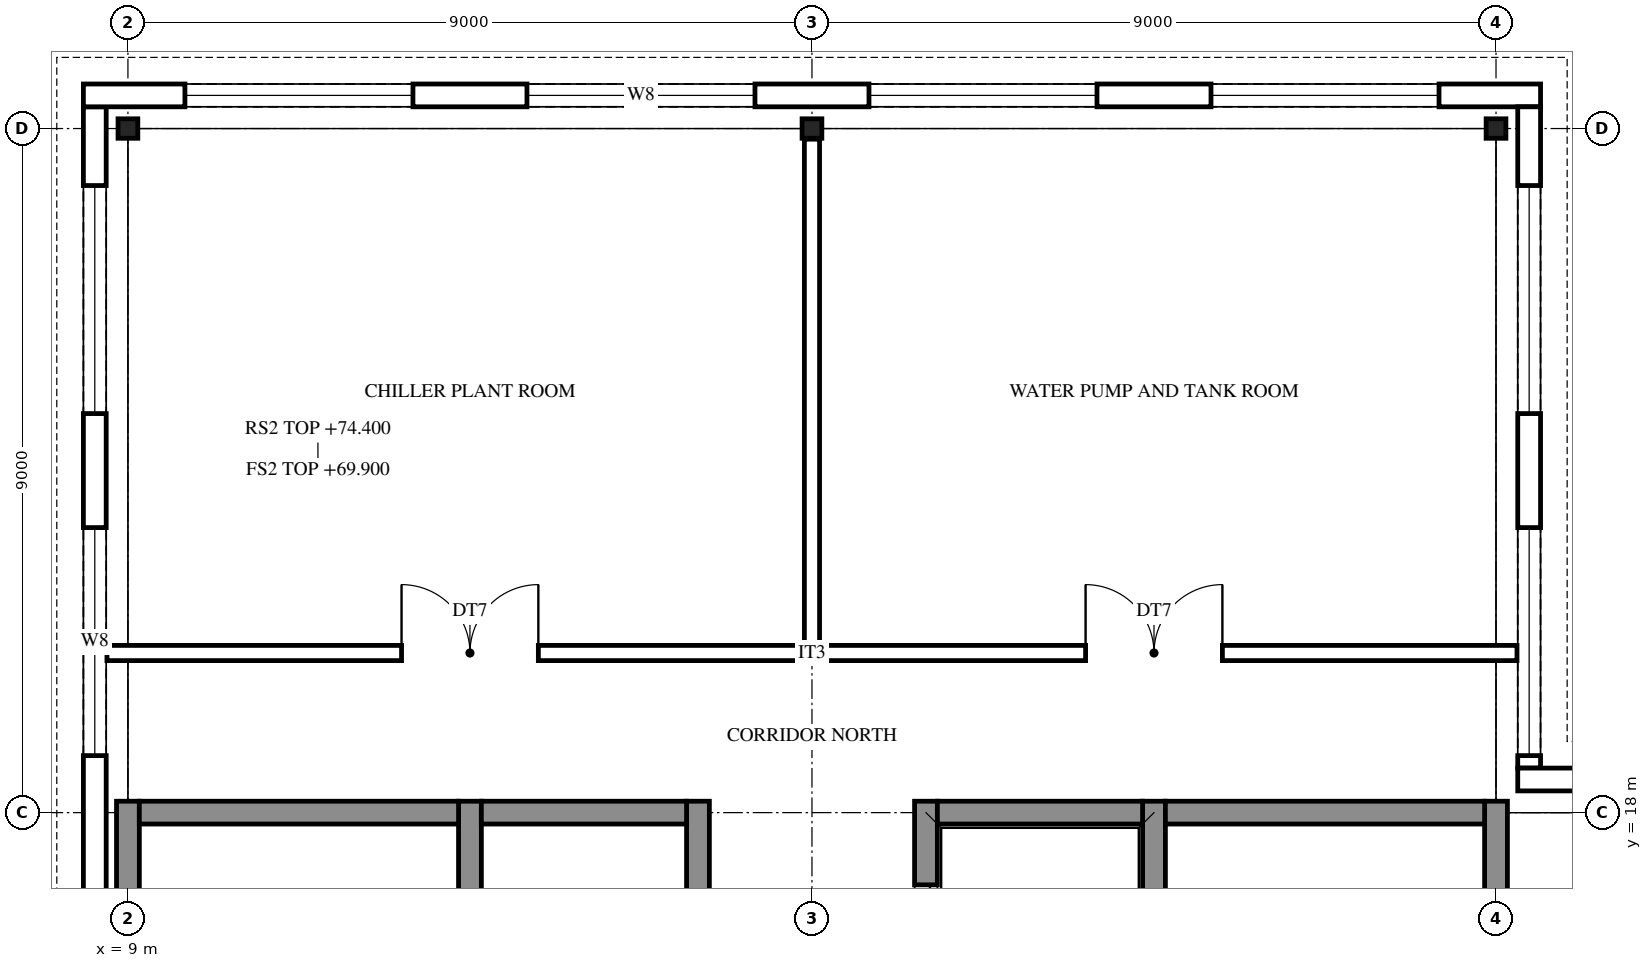
"""IFC4 building model, lengths in metres.
Left out: names, types, materials, properties, quantities, classifications, styles, units other than length and angle.
Written with IfcOpenShell. Run it as: python <this file> out.ifc"""

import sys

from ifc_helpers import new_model, si_unit, direction, frame, frame_2d, origin, origin_2d, place, context, subcontext, project, spatial, rectangle, i_section, extrude, element, fill, save


model = new_model("IFC4")
c1 = context("Model", 3, precision=1e-05, world=origin(), true_north=direction((0.0, 1.0)))
c2 = subcontext(c1, "Body", "Model", "MODEL_VIEW")
j1 = project(units=[si_unit("LENGTHUNIT", "METRE"), si_unit("PLANEANGLEUNIT", "RADIAN")], contexts=[c1])
p1 = place(None, origin())
s1 = spatial("IfcSite", under=j1, at=p1, CompositionType="ELEMENT")
p2 = place(p1, origin())
s2 = spatial("IfcBuilding", under=s1, at=p2, CompositionType="ELEMENT")
p3 = place(p2, frame((0.0, 0.0, 69.9)))
s3 = spatial("IfcBuildingStorey", under=s2, at=p3, CompositionType="ELEMENT", Elevation=69.9)
for number, where, z_axis, x_axis in (
    (1, (9.0, 27.0, 0.0), (0.0, 0.0, 1.0), (0.0, 1.0, 0.0)),
    (2, (18.0, 27.0, 0.0), (0.0, 0.0, 1.0), (0.0, 1.0, 0.0)),
    (3, (27.0, 27.0, 0.0), (0.0, 0.0, 1.0), (0.0, 1.0, 0.0)),
):
    element("IfcColumn", number, at=place(p3, frame(where, z_axis=z_axis, x_axis=x_axis)), inside=s3, PredefinedType="COLUMN", context=c2, shape_type="SweptSolid", body=[
        extrude(i_section(OverallWidth=0.256, OverallDepth=0.26, WebThickness=0.01, FlangeThickness=0.017, FilletRadius=0.014, at=origin_2d()), origin(), (0.0, 0.0, 1.0), 4.5),
    ])
for number, where, z_axis, x_axis in (
    (4, (9.0, 8.85, 0.0), (0.0, 0.0, 1.0), (0.0, 1.0, 0.0)),
    (5, (13.5, 8.85, 0.0), (0.0, 0.0, 1.0), (0.0, 1.0, 0.0)),
):
    element("IfcWall", number, at=place(p3, frame(where, z_axis=z_axis, x_axis=x_axis)), inside=s3, PredefinedType="SHEAR", context=c2, shape_type="SweptSolid", body=[
        extrude(rectangle(XDim=9.3, YDim=0.3, at=frame_2d((4.65, 0.0))), origin(), (0.0, 0.0, 1.0), 4.5),
    ])
p4 = place(p3, frame((16.5, 8.85, 0.0), z_axis=(0.0, 0.0, 1.0), x_axis=(0.0, 1.0, 0.0)))
e6 = element("IfcWall", 6, at=p4, inside=s3, PredefinedType="SHEAR", context=c2, shape_type="SweptSolid", body=[
    extrude(rectangle(XDim=9.3, YDim=0.3, at=frame_2d((4.65, 0.0))), origin(), (0.0, 0.0, 1.0), 4.5),
])
p5 = place(p4, frame((1.1, 0.0, 0.0)))
e7 = element("IfcOpeningElement", 7, at=p5, cuts=e6, PredefinedType="OPENING", context=c2, shape_type="SweptSolid", body=[
    extrude(rectangle(XDim=1.1, YDim=2.1, at=frame_2d((0.55, 1.05))), frame((0.0, 0.16, 0.0), z_axis=(0.0, -1.0, 0.0), x_axis=(1.0, 0.0, 0.0)), (0.0, 0.0, 1.0), 0.32),
])
p6 = place(p4, frame((4.1, 0.0, 0.0)))
e8 = element("IfcOpeningElement", 8, at=p6, cuts=e6, PredefinedType="OPENING", context=c2, shape_type="SweptSolid", body=[
    extrude(rectangle(XDim=1.1, YDim=2.1, at=frame_2d((0.55, 1.05))), frame((0.0, 0.16, 0.0), z_axis=(0.0, -1.0, 0.0), x_axis=(1.0, 0.0, 0.0)), (0.0, 0.0, 1.0), 0.32),
])
p7 = place(p3, frame((19.5, 8.85, 0.0), z_axis=(0.0, 0.0, 1.0), x_axis=(0.0, 1.0, 0.0)))
e9 = element("IfcWall", 9, at=p7, inside=s3, PredefinedType="SHEAR", context=c2, shape_type="SweptSolid", body=[
    extrude(rectangle(XDim=9.3, YDim=0.3, at=frame_2d((4.65, 0.0))), origin(), (0.0, 0.0, 1.0), 4.5),
])
p8 = place(p7, frame((3.95, 0.0, 0.0)))
e10 = element("IfcOpeningElement", 10, at=p8, cuts=e9, PredefinedType="OPENING", context=c2, shape_type="SweptSolid", body=[
    extrude(rectangle(XDim=1.4, YDim=2.1, at=frame_2d((0.7, 1.05))), frame((0.0, 0.16, 0.0), z_axis=(0.0, -1.0, 0.0), x_axis=(1.0, 0.0, 0.0)), (0.0, 0.0, 1.0), 0.32),
])
p9 = place(p7, frame((7.1, 0.0, 0.0)))
e11 = element("IfcOpeningElement", 11, at=p9, cuts=e9, PredefinedType="OPENING", context=c2, shape_type="SweptSolid", body=[
    extrude(rectangle(XDim=1.1, YDim=2.1, at=frame_2d((0.55, 1.05))), frame((0.0, 0.16, 0.0), z_axis=(0.0, -1.0, 0.0), x_axis=(1.0, 0.0, 0.0)), (0.0, 0.0, 1.0), 0.32),
])
for number, where, z_axis, x_axis in (
    (12, (22.5, 8.85, 0.0), (0.0, 0.0, 1.0), (0.0, 1.0, 0.0)),
    (13, (27.0, 8.85, 0.0), (0.0, 0.0, 1.0), (0.0, 1.0, 0.0)),
):
    element("IfcWall", number, at=place(p3, frame(where, z_axis=z_axis, x_axis=x_axis)), inside=s3, PredefinedType="SHEAR", context=c2, shape_type="SweptSolid", body=[
        extrude(rectangle(XDim=9.3, YDim=0.3, at=frame_2d((4.65, 0.0))), origin(), (0.0, 0.0, 1.0), 4.5),
    ])
p10 = place(p3, frame((9.15, 18.0, 0.0), z_axis=(0.0, 0.0, 1.0), x_axis=(1.0, 0.0, 0.0)))
e14 = element("IfcWall", 14, at=p10, inside=s3, PredefinedType="SHEAR", context=c2, shape_type="SweptSolid", body=[
    extrude(rectangle(XDim=4.2, YDim=0.3, at=frame_2d((2.1, 0.0))), origin(), (0.0, 0.0, 1.0), 4.5),
])
for number, where, z_axis, x_axis in (
    (15, (13.65, 18.0, 0.0), (0.0, 0.0, 1.0), (1.0, 0.0, 0.0)),
    (16, (19.65, 18.0, 0.0), (0.0, 0.0, 1.0), (1.0, 0.0, 0.0)),
):
    element("IfcWall", number, at=place(p3, frame(where, z_axis=z_axis, x_axis=x_axis)), inside=s3, PredefinedType="SHEAR", context=c2, shape_type="SweptSolid", body=[
        extrude(rectangle(XDim=2.7, YDim=0.3, at=frame_2d((1.35, 0.0))), origin(), (0.0, 0.0, 1.0), 4.5),
    ])
p11 = place(p3, frame((22.65, 18.0, 0.0), z_axis=(0.0, 0.0, 1.0), x_axis=(1.0, 0.0, 0.0)))
e17 = element("IfcWall", 17, at=p11, inside=s3, PredefinedType="SHEAR", context=c2, shape_type="SweptSolid", body=[
    extrude(rectangle(XDim=4.2, YDim=0.3, at=frame_2d((2.1, 0.0))), origin(), (0.0, 0.0, 1.0), 4.5),
])
p12 = place(p3, frame((8.564, -0.286, 0.0), z_axis=(0.0, 0.0, 1.0), x_axis=(0.0, 1.0, 0.0)))
e18 = element("IfcWall", 18, at=p12, inside=s3, PredefinedType="STANDARD", context=c2, shape_type="SweptSolid", body=[
    extrude(rectangle(XDim=27.572, YDim=0.3, at=frame_2d((13.786, 0.0))), origin(), (0.0, 0.0, 1.0), 4.5),
])
p13 = place(p12, frame((1.036, 0.0, 0.6)))
e19 = element("IfcOpeningElement", 19, at=p13, cuts=e18, PredefinedType="OPENING", context=c2, shape_type="SweptSolid", body=[
    extrude(rectangle(XDim=3.0, YDim=3.1, at=frame_2d((1.5, 1.55))), frame((0.0, 0.16, 0.0), z_axis=(0.0, -1.0, 0.0), x_axis=(1.0, 0.0, 0.0)), (0.0, 0.0, 1.0), 0.32),
])
p14 = place(p12, frame((5.536, 0.0, 0.6)))
e20 = element("IfcOpeningElement", 20, at=p14, cuts=e18, PredefinedType="OPENING", context=c2, shape_type="SweptSolid", body=[
    extrude(rectangle(XDim=3.0, YDim=3.1, at=frame_2d((1.5, 1.55))), frame((0.0, 0.16, 0.0), z_axis=(0.0, -1.0, 0.0), x_axis=(1.0, 0.0, 0.0)), (0.0, 0.0, 1.0), 0.32),
])
p15 = place(p12, frame((19.036, 0.0, 0.6)))
e21 = element("IfcOpeningElement", 21, at=p15, cuts=e18, PredefinedType="OPENING", context=c2, shape_type="SweptSolid", body=[
    extrude(rectangle(XDim=3.0, YDim=3.1, at=frame_2d((1.5, 1.55))), frame((0.0, 0.16, 0.0), z_axis=(0.0, -1.0, 0.0), x_axis=(1.0, 0.0, 0.0)), (0.0, 0.0, 1.0), 0.32),
])
p16 = place(p12, frame((23.536, 0.0, 0.6)))
e22 = element("IfcOpeningElement", 22, at=p16, cuts=e18, PredefinedType="OPENING", context=c2, shape_type="SweptSolid", body=[
    extrude(rectangle(XDim=3.0, YDim=3.1, at=frame_2d((1.5, 1.55))), frame((0.0, 0.16, 0.0), z_axis=(0.0, -1.0, 0.0), x_axis=(1.0, 0.0, 0.0)), (0.0, 0.0, 1.0), 0.32),
])
p17 = place(p3, frame((8.414, 27.436, 0.0), z_axis=(0.0, 0.0, 1.0), x_axis=(1.0, 0.0, 0.0)))
e23 = element("IfcWall", 23, at=p17, inside=s3, PredefinedType="STANDARD", context=c2, shape_type="SweptSolid", body=[
    extrude(rectangle(XDim=19.172, YDim=0.3, at=frame_2d((9.586, 0.0))), origin(), (0.0, 0.0, 1.0), 4.5),
])
p18 = place(p17, frame((1.336, 0.0, 0.6)))
e24 = element("IfcOpeningElement", 24, at=p18, cuts=e23, PredefinedType="OPENING", context=c2, shape_type="SweptSolid", body=[
    extrude(rectangle(XDim=3.0, YDim=3.1, at=frame_2d((1.5, 1.55))), frame((0.0, 0.16, 0.0), z_axis=(0.0, -1.0, 0.0), x_axis=(1.0, 0.0, 0.0)), (0.0, 0.0, 1.0), 0.32),
])
p19 = place(p17, frame((5.836, 0.0, 0.6)))
e25 = element("IfcOpeningElement", 25, at=p19, cuts=e23, PredefinedType="OPENING", context=c2, shape_type="SweptSolid", body=[
    extrude(rectangle(XDim=3.0, YDim=3.1, at=frame_2d((1.5, 1.55))), frame((0.0, 0.16, 0.0), z_axis=(0.0, -1.0, 0.0), x_axis=(1.0, 0.0, 0.0)), (0.0, 0.0, 1.0), 0.32),
])
p20 = place(p17, frame((10.336, 0.0, 0.6)))
e26 = element("IfcOpeningElement", 26, at=p20, cuts=e23, PredefinedType="OPENING", context=c2, shape_type="SweptSolid", body=[
    extrude(rectangle(XDim=3.0, YDim=3.1, at=frame_2d((1.5, 1.55))), frame((0.0, 0.16, 0.0), z_axis=(0.0, -1.0, 0.0), x_axis=(1.0, 0.0, 0.0)), (0.0, 0.0, 1.0), 0.32),
])
p21 = place(p17, frame((14.836, 0.0, 0.6)))
e27 = element("IfcOpeningElement", 27, at=p21, cuts=e23, PredefinedType="OPENING", context=c2, shape_type="SweptSolid", body=[
    extrude(rectangle(XDim=3.0, YDim=3.1, at=frame_2d((1.5, 1.55))), frame((0.0, 0.16, 0.0), z_axis=(0.0, -1.0, 0.0), x_axis=(1.0, 0.0, 0.0)), (0.0, 0.0, 1.0), 0.32),
])
p22 = place(p3, frame((27.436, 27.286, 0.0), z_axis=(0.0, 0.0, 1.0), x_axis=(0.0, -1.0, 0.0)))
e28 = element("IfcWall", 28, at=p22, inside=s3, PredefinedType="STANDARD", context=c2, shape_type="SweptSolid", body=[
    extrude(rectangle(XDim=8.7, YDim=0.3, at=frame_2d((4.35, 0.0))), origin(), (0.0, 0.0, 1.0), 4.5),
])
p23 = place(p22, frame((5.536, 0.0, 0.6)))
e29 = element("IfcOpeningElement", 29, at=p23, cuts=e28, PredefinedType="OPENING", context=c2, shape_type="SweptSolid", body=[
    extrude(rectangle(XDim=3.0, YDim=3.1, at=frame_2d((1.5, 1.55))), frame((0.0, 0.16, 0.0), z_axis=(0.0, -1.0, 0.0), x_axis=(1.0, 0.0, 0.0)), (0.0, 0.0, 1.0), 0.32),
])
p24 = place(p22, frame((1.036, 0.0, 0.6)))
e30 = element("IfcOpeningElement", 30, at=p24, cuts=e28, PredefinedType="OPENING", context=c2, shape_type="SweptSolid", body=[
    extrude(rectangle(XDim=3.0, YDim=3.1, at=frame_2d((1.5, 1.55))), frame((0.0, 0.16, 0.0), z_axis=(0.0, -1.0, 0.0), x_axis=(1.0, 0.0, 0.0)), (0.0, 0.0, 1.0), 0.32),
])
p25 = place(p3, frame((27.286, 18.436, 0.0), z_axis=(0.0, 0.0, 1.0), x_axis=(1.0, 0.0, 0.0)))
e31 = element("IfcWall", 31, at=p25, inside=s3, PredefinedType="STANDARD", context=c2, shape_type="SweptSolid", body=[
    extrude(rectangle(XDim=4.789, YDim=0.3, at=frame_2d((2.395, 0.0))), origin(), (0.0, 0.0, 1.0), 4.5),
])
p26 = place(p3, frame((8.564, -0.286, 4.5), z_axis=(0.0, 0.0, 1.0), x_axis=(0.0, 1.0, 0.0)))
e32 = element("IfcWall", 32, at=p26, inside=s3, PredefinedType="PARAPET", context=c2, shape_type="SweptSolid", body=[
    extrude(rectangle(XDim=27.572, YDim=0.3, at=frame_2d((13.786, 0.0))), origin(), (0.0, 0.0, 1.0), 1.25),
])
p27 = place(p3, frame((8.414, 27.436, 4.5), z_axis=(0.0, 0.0, 1.0), x_axis=(1.0, 0.0, 0.0)))
e33 = element("IfcWall", 33, at=p27, inside=s3, PredefinedType="PARAPET", context=c2, shape_type="SweptSolid", body=[
    extrude(rectangle(XDim=19.172, YDim=0.3, at=frame_2d((9.586, 0.0))), origin(), (0.0, 0.0, 1.0), 1.25),
])
p28 = place(p3, frame((27.436, 27.286, 4.5), z_axis=(0.0, 0.0, 1.0), x_axis=(0.0, -1.0, 0.0)))
e34 = element("IfcWall", 34, at=p28, inside=s3, PredefinedType="PARAPET", context=c2, shape_type="SweptSolid", body=[
    extrude(rectangle(XDim=8.7, YDim=0.3, at=frame_2d((4.35, 0.0))), origin(), (0.0, 0.0, 1.0), 1.25),
])
p29 = place(p3, frame((27.286, 18.436, 4.5), z_axis=(0.0, 0.0, 1.0), x_axis=(1.0, 0.0, 0.0)))
e35 = element("IfcWall", 35, at=p29, inside=s3, PredefinedType="PARAPET", context=c2, shape_type="SweptSolid", body=[
    extrude(rectangle(XDim=4.789, YDim=0.3, at=frame_2d((2.395, 0.0))), origin(), (0.0, 0.0, 1.0), 1.25),
])
p30 = place(p3, frame((18.0, 20.21, 0.0), z_axis=(0.0, 0.0, 1.0), x_axis=(0.0, 1.0, 0.0)))
e36 = element("IfcWall", 36, at=p30, inside=s3, PredefinedType="PARTITIONING", context=c2, shape_type="SweptSolid", body=[
    extrude(rectangle(XDim=6.65, YDim=0.2, at=frame_2d((3.325, 0.0))), origin(), (0.0, 0.0, 1.0), 3.822),
])
p31 = place(p3, frame((8.724, 20.1, 0.0), z_axis=(0.0, 0.0, 1.0), x_axis=(1.0, 0.0, 0.0)))
e37 = element("IfcWall", 37, at=p31, inside=s3, PredefinedType="PARTITIONING", context=c2, shape_type="SweptSolid", body=[
    extrude(rectangle(XDim=18.552, YDim=0.2, at=frame_2d((9.276, 0.0))), origin(), (0.0, 0.0, 1.0), 3.822),
])
p32 = place(p31, frame((3.876, 0.0, 0.0)))
e38 = element("IfcOpeningElement", 38, at=p32, cuts=e37, PredefinedType="OPENING", context=c2, shape_type="SweptSolid", body=[
    extrude(rectangle(XDim=1.8, YDim=2.1, at=frame_2d((0.9, 1.05))), frame((0.0, 0.11, 0.0), z_axis=(0.0, -1.0, 0.0), x_axis=(1.0, 0.0, 0.0)), (0.0, 0.0, 1.0), 0.22),
])
p33 = place(p31, frame((12.876, 0.0, 0.0)))
e39 = element("IfcOpeningElement", 39, at=p33, cuts=e37, PredefinedType="OPENING", context=c2, shape_type="SweptSolid", body=[
    extrude(rectangle(XDim=1.8, YDim=2.1, at=frame_2d((0.9, 1.05))), frame((0.0, 0.11, 0.0), z_axis=(0.0, -1.0, 0.0), x_axis=(1.0, 0.0, 0.0)), (0.0, 0.0, 1.0), 0.22),
])
for number, where, z_axis, x_axis in (
    (40, (13.5, 8.85, 4.5), (0.0, 0.0, 1.0), (0.0, 1.0, 0.0)),
    (41, (16.5, 8.85, 4.5), (0.0, 0.0, 1.0), (0.0, 1.0, 0.0)),
):
    element("IfcWall", number, at=place(p3, frame(where, z_axis=z_axis, x_axis=x_axis)), inside=s3, PredefinedType="SOLIDWALL", context=c2, shape_type="SweptSolid", body=[
        extrude(rectangle(XDim=9.3, YDim=0.3, at=frame_2d((4.65, 0.0))), origin(), (0.0, 0.0, 1.0), 4.5),
    ])
p34 = place(p3, frame((13.65, 18.0, 4.5), z_axis=(0.0, 0.0, 1.0), x_axis=(1.0, 0.0, 0.0)))
e42 = element("IfcWall", 42, at=p34, inside=s3, PredefinedType="SOLIDWALL", context=c2, shape_type="SweptSolid", body=[
    extrude(rectangle(XDim=2.7, YDim=0.3, at=frame_2d((1.35, 0.0))), origin(), (0.0, 0.0, 1.0), 4.5),
])
for number, where, z_axis, x_axis in (
    (43, (19.5, 8.85, 4.5), (0.0, 0.0, 1.0), (0.0, 1.0, 0.0)),
    (44, (22.5, 8.85, 4.5), (0.0, 0.0, 1.0), (0.0, 1.0, 0.0)),
):
    element("IfcWall", number, at=place(p3, frame(where, z_axis=z_axis, x_axis=x_axis)), inside=s3, PredefinedType="SOLIDWALL", context=c2, shape_type="SweptSolid", body=[
        extrude(rectangle(XDim=9.3, YDim=0.3, at=frame_2d((4.65, 0.0))), origin(), (0.0, 0.0, 1.0), 4.5),
    ])
p35 = place(p3, frame((19.65, 18.0, 4.5), z_axis=(0.0, 0.0, 1.0), x_axis=(1.0, 0.0, 0.0)))
e45 = element("IfcWall", 45, at=p35, inside=s3, PredefinedType="SOLIDWALL", context=c2, shape_type="SweptSolid", body=[
    extrude(rectangle(XDim=2.7, YDim=0.3, at=frame_2d((1.35, 0.0))), origin(), (0.0, 0.0, 1.0), 4.5),
])
p36 = place(p15, origin())
e46 = element("IfcWindow", 46, at=p36, inside=s3, PartitioningType="SINGLE_PANEL", PredefinedType="WINDOW", context=c2, shape_type="SweptSolid", body=[
    extrude(rectangle(XDim=3.0, YDim=3.1, at=frame_2d((1.5, 1.55))), frame((0.0, 0.03, 0.0), z_axis=(0.0, -1.0, 0.0), x_axis=(1.0, 0.0, 0.0)), (0.0, 0.0, 1.0), 0.06),
])
fill(e21, e46)
p37 = place(p16, origin())
e47 = element("IfcWindow", 47, at=p37, inside=s3, PartitioningType="SINGLE_PANEL", PredefinedType="WINDOW", context=c2, shape_type="SweptSolid", body=[
    extrude(rectangle(XDim=3.0, YDim=3.1, at=frame_2d((1.5, 1.55))), frame((0.0, 0.03, 0.0), z_axis=(0.0, -1.0, 0.0), x_axis=(1.0, 0.0, 0.0)), (0.0, 0.0, 1.0), 0.06),
])
fill(e22, e47)
p38 = place(p18, origin())
e48 = element("IfcWindow", 48, at=p38, inside=s3, PartitioningType="SINGLE_PANEL", PredefinedType="WINDOW", context=c2, shape_type="SweptSolid", body=[
    extrude(rectangle(XDim=3.0, YDim=3.1, at=frame_2d((1.5, 1.55))), frame((0.0, 0.03, 0.0), z_axis=(0.0, -1.0, 0.0), x_axis=(1.0, 0.0, 0.0)), (0.0, 0.0, 1.0), 0.06),
])
fill(e24, e48)
p39 = place(p19, origin())
e49 = element("IfcWindow", 49, at=p39, inside=s3, PartitioningType="SINGLE_PANEL", PredefinedType="WINDOW", context=c2, shape_type="SweptSolid", body=[
    extrude(rectangle(XDim=3.0, YDim=3.1, at=frame_2d((1.5, 1.55))), frame((0.0, 0.03, 0.0), z_axis=(0.0, -1.0, 0.0), x_axis=(1.0, 0.0, 0.0)), (0.0, 0.0, 1.0), 0.06),
])
fill(e25, e49)
p40 = place(p20, origin())
e50 = element("IfcWindow", 50, at=p40, inside=s3, PartitioningType="SINGLE_PANEL", PredefinedType="WINDOW", context=c2, shape_type="SweptSolid", body=[
    extrude(rectangle(XDim=3.0, YDim=3.1, at=frame_2d((1.5, 1.55))), frame((0.0, 0.03, 0.0), z_axis=(0.0, -1.0, 0.0), x_axis=(1.0, 0.0, 0.0)), (0.0, 0.0, 1.0), 0.06),
])
fill(e26, e50)
p41 = place(p21, origin())
e51 = element("IfcWindow", 51, at=p41, inside=s3, PartitioningType="SINGLE_PANEL", PredefinedType="WINDOW", context=c2, shape_type="SweptSolid", body=[
    extrude(rectangle(XDim=3.0, YDim=3.1, at=frame_2d((1.5, 1.55))), frame((0.0, 0.03, 0.0), z_axis=(0.0, -1.0, 0.0), x_axis=(1.0, 0.0, 0.0)), (0.0, 0.0, 1.0), 0.06),
])
fill(e27, e51)
p42 = place(p23, origin())
e52 = element("IfcWindow", 52, at=p42, inside=s3, PartitioningType="SINGLE_PANEL", PredefinedType="WINDOW", context=c2, shape_type="SweptSolid", body=[
    extrude(rectangle(XDim=3.0, YDim=3.1, at=frame_2d((1.5, 1.55))), frame((0.0, 0.03, 0.0), z_axis=(0.0, -1.0, 0.0), x_axis=(1.0, 0.0, 0.0)), (0.0, 0.0, 1.0), 0.06),
])
fill(e29, e52)
p43 = place(p24, origin())
e53 = element("IfcWindow", 53, at=p43, inside=s3, PartitioningType="SINGLE_PANEL", PredefinedType="WINDOW", context=c2, shape_type="SweptSolid", body=[
    extrude(rectangle(XDim=3.0, YDim=3.1, at=frame_2d((1.5, 1.55))), frame((0.0, 0.03, 0.0), z_axis=(0.0, -1.0, 0.0), x_axis=(1.0, 0.0, 0.0)), (0.0, 0.0, 1.0), 0.06),
])
fill(e30, e53)
p44 = place(p32, origin())
e54 = element("IfcDoor", 54, at=p44, inside=s3, OperationType="DOUBLE_DOOR_SINGLE_SWING", PredefinedType="DOOR", context=c2, shape_type="SweptSolid", body=[
    extrude(rectangle(XDim=1.8, YDim=2.1, at=frame_2d((0.9, 1.05))), frame((0.0, 0.025, 0.0), z_axis=(0.0, -1.0, 0.0), x_axis=(1.0, 0.0, 0.0)), (0.0, 0.0, 1.0), 0.05),
])
fill(e38, e54)
p45 = place(p33, origin())
e55 = element("IfcDoor", 55, at=p45, inside=s3, OperationType="DOUBLE_DOOR_SINGLE_SWING", PredefinedType="DOOR", context=c2, shape_type="SweptSolid", body=[
    extrude(rectangle(XDim=1.8, YDim=2.1, at=frame_2d((0.9, 1.05))), frame((0.0, 0.025, 0.0), z_axis=(0.0, -1.0, 0.0), x_axis=(1.0, 0.0, 0.0)), (0.0, 0.0, 1.0), 0.05),
])
fill(e39, e55)
p46 = place(p9, origin())
e56 = element("IfcDoor", 56, at=p46, inside=s3, OperationType="DOUBLE_DOOR_SLIDING", PredefinedType="DOOR", context=c2, shape_type="SweptSolid", body=[
    extrude(rectangle(XDim=1.1, YDim=2.1, at=frame_2d((0.55, 1.05))), frame((0.0, 0.025, 0.0), z_axis=(0.0, -1.0, 0.0), x_axis=(1.0, 0.0, 0.0)), (0.0, 0.0, 1.0), 0.05),
])
fill(e11, e56)
save(model, sys.argv[1])
